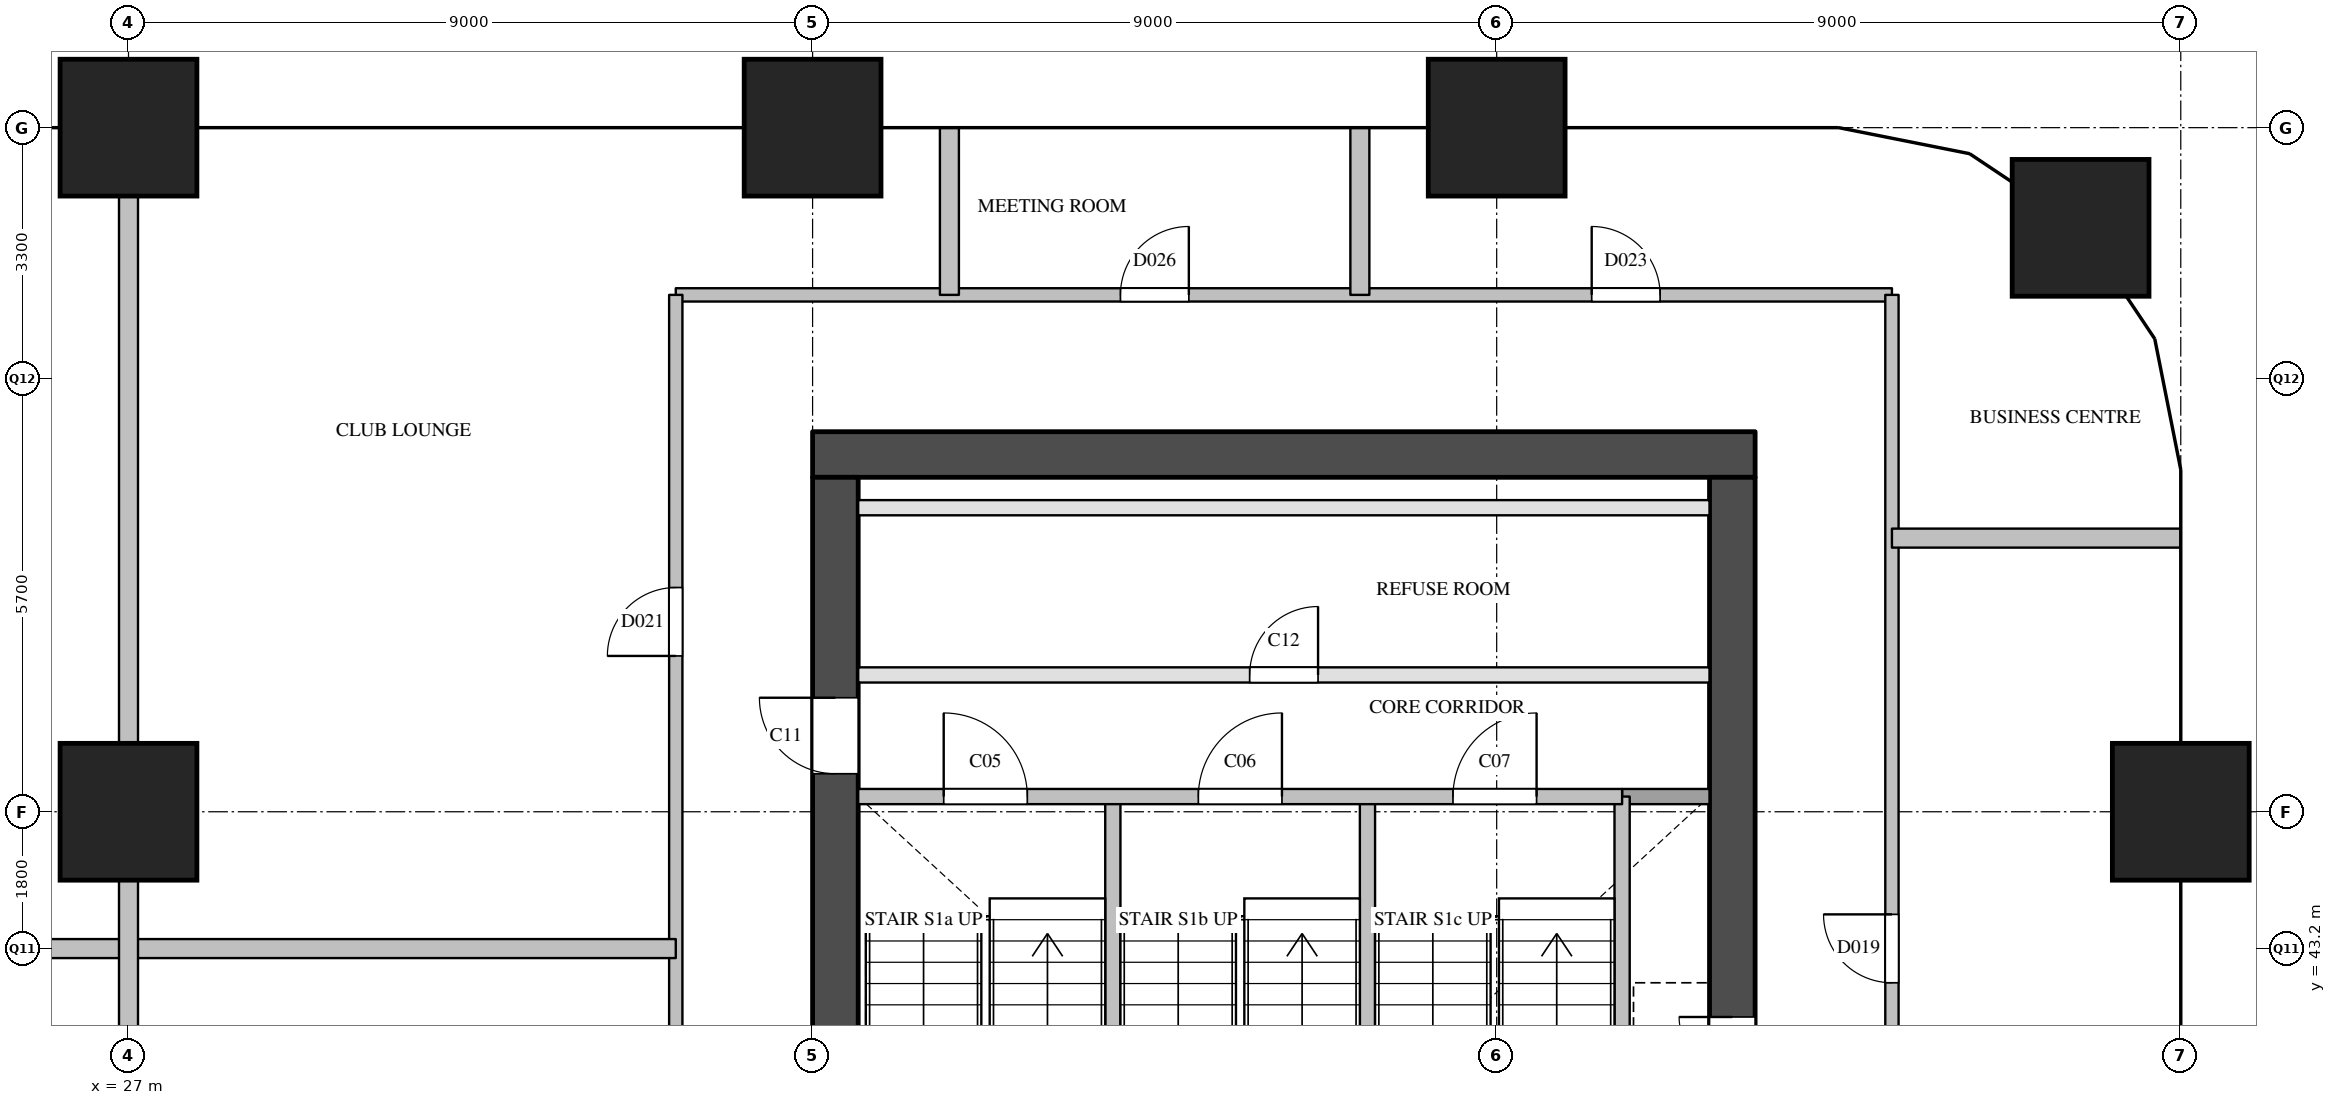
"""IFC4 building model, lengths in metres.
Left out: names, types, materials, properties, quantities, classifications, styles, units other than length and angle.
Written with IfcOpenShell. Run it as: python <this file> out.ifc"""

import sys

from ifc_helpers import new_model, si_unit, direction, frame, frame_2d, origin, origin_2d, place, context, subcontext, project, spatial, rectangle, extrude, element, fill, save


model = new_model("IFC4")
c1 = context("Model", 3, precision=1e-05, world=origin(), true_north=direction((0.0, 1.0)))
c2 = subcontext(c1, "Body", "Model", "MODEL_VIEW")
j1 = project(units=[si_unit("LENGTHUNIT", "METRE"), si_unit("PLANEANGLEUNIT", "RADIAN")], contexts=[c1])
p1 = place(None, origin())
s1 = spatial("IfcSite", under=j1, at=p1, CompositionType="ELEMENT")
p2 = place(p1, origin())
s2 = spatial("IfcBuilding", under=s1, at=p2, CompositionType="ELEMENT")
p3 = place(p2, frame((0.0, 0.0, 89.2)))
s3 = spatial("IfcBuildingStorey", under=s2, at=p3, CompositionType="ELEMENT", Elevation=89.2)
for number, where, z_axis, x_axis in (
    (1, (27.0, 45.0, 0.0), (0.0, 0.0, 1.0), (1.0, 0.0, 0.0)),
    (2, (27.0, 54.0, 0.0), (0.0, 0.0, 1.0), (1.0, 0.0, 0.0)),
    (3, (36.0, 54.0, 0.0), (0.0, 0.0, 1.0), (1.0, 0.0, 0.0)),
    (4, (45.0, 54.0, 0.0), (0.0, 0.0, 1.0), (1.0, 0.0, 0.0)),
    (5, (54.0, 45.0, 0.0), (0.0, 0.0, 1.0), (1.0, 0.0, 0.0)),
    (6, (52.682, 52.682, 0.0), (0.0, 0.0, 1.0), (1.0, 0.0, 0.0)),
):
    element("IfcColumn", number, at=place(p3, frame(where, z_axis=z_axis, x_axis=x_axis)), inside=s3, PredefinedType="COLUMN", context=c2, shape_type="SweptSolid", body=[
        extrude(rectangle(XDim=1.8, YDim=1.8, at=origin_2d()), origin(), (0.0, 0.0, 1.0), 3.8),
    ])
p4 = place(p3, frame((36.0, 49.7, 0.0), z_axis=(0.0, 0.0, 1.0), x_axis=(1.0, 0.0, 0.0)))
e7 = element("IfcWall", 7, at=p4, inside=s3, PredefinedType="SHEAR", context=c2, shape_type="SweptSolid", body=[
    extrude(rectangle(XDim=12.4, YDim=0.6, at=frame_2d((6.2, 0.0))), origin(), (0.0, 0.0, 1.0), 3.5),
])
p5 = place(p3, frame((36.3, 29.1, 0.0), z_axis=(0.0, 0.0, 1.0), x_axis=(0.0, 1.0, 0.0)))
e8 = element("IfcWall", 8, at=p5, inside=s3, PredefinedType="SHEAR", context=c2, shape_type="SweptSolid", body=[
    extrude(rectangle(XDim=20.3, YDim=0.6, at=frame_2d((10.15, 0.0))), origin(), (0.0, 0.0, 1.0), 3.5),
])
p6 = place(p5, frame((3.6, 0.0, 0.0)))
e9 = element("IfcOpeningElement", 9, at=p6, cuts=e8, PredefinedType="OPENING", context=c2, shape_type="SweptSolid", body=[
    extrude(rectangle(XDim=1.8, YDim=2.1, at=frame_2d((0.9, 1.05))), frame((0.0, 0.31, 0.0), z_axis=(0.0, -1.0, 0.0), x_axis=(1.0, 0.0, 0.0)), (0.0, 0.0, 1.0), 0.62),
])
p7 = place(p5, frame((16.4, 0.0, 0.0)))
e10 = element("IfcOpeningElement", 10, at=p7, cuts=e8, PredefinedType="OPENING", context=c2, shape_type="SweptSolid", body=[
    extrude(rectangle(XDim=1.0, YDim=2.1, at=frame_2d((0.5, 1.05))), frame((0.0, 0.31, 0.0), z_axis=(0.0, -1.0, 0.0), x_axis=(1.0, 0.0, 0.0)), (0.0, 0.0, 1.0), 0.62),
])
p8 = place(p3, frame((48.1, 29.1, 0.0), z_axis=(0.0, 0.0, 1.0), x_axis=(0.0, 1.0, 0.0)))
e11 = element("IfcWall", 11, at=p8, inside=s3, PredefinedType="SHEAR", context=c2, shape_type="SweptSolid", body=[
    extrude(rectangle(XDim=20.3, YDim=0.6, at=frame_2d((10.15, 0.0))), origin(), (0.0, 0.0, 1.0), 3.5),
])
p9 = place(p8, frame((12.5, 0.0, 0.0)))
e12 = element("IfcOpeningElement", 12, at=p9, cuts=e11, PredefinedType="OPENING", context=c2, shape_type="SweptSolid", body=[
    extrude(rectangle(XDim=0.7, YDim=2.1, at=frame_2d((0.35, 1.05))), frame((0.0, 0.31, 0.0), z_axis=(0.0, -1.0, 0.0), x_axis=(1.0, 0.0, 0.0)), (0.0, 0.0, 1.0), 0.62),
])
p10 = place(p8, frame((3.9, 0.0, 0.0)))
e13 = element("IfcOpeningElement", 13, at=p10, cuts=e11, PredefinedType="OPENING", context=c2, shape_type="SweptSolid", body=[
    extrude(rectangle(XDim=1.8, YDim=2.1, at=frame_2d((0.9, 1.05))), frame((0.0, 0.31, 0.0), z_axis=(0.0, -1.0, 0.0), x_axis=(1.0, 0.0, 0.0)), (0.0, 0.0, 1.0), 0.62),
])
for number, where, z_axis, x_axis in (
    (14, (39.95, 40.78, 0.0), (0.0, 0.0, 1.0), (0.0, 1.0, 0.0)),
    (15, (43.3, 40.78, 0.0), (0.0, 0.0, 1.0), (0.0, 1.0, 0.0)),
    (16, (46.65, 40.78, 0.0), (0.0, 0.0, 1.0), (0.0, 1.0, 0.0)),
):
    element("IfcWall", number, at=place(p3, frame(where, z_axis=z_axis, x_axis=x_axis)), inside=s3, PredefinedType="SOLIDWALL", context=c2, shape_type="SweptSolid", body=[
        extrude(rectangle(XDim=4.42, YDim=0.2, at=frame_2d((2.21, 0.0))), origin(), (0.0, 0.0, 1.0), 3.5),
    ])
p11 = place(p3, frame((46.65, 45.2, 0.0), z_axis=(0.0, 0.0, 1.0), x_axis=(1.0, 0.0, 0.0)))
e17 = element("IfcWall", 17, at=p11, inside=s3, PredefinedType="SOLIDWALL", context=c2, shape_type="SweptSolid", body=[
    extrude(rectangle(XDim=1.15, YDim=0.2, at=frame_2d((0.575, 0.0))), origin(), (0.0, 0.0, 1.0), 3.5),
])
p12 = place(p3, frame((36.6, 45.2, 0.0), z_axis=(0.0, 0.0, 1.0), x_axis=(1.0, 0.0, 0.0)))
e18 = element("IfcWall", 18, at=p12, inside=s3, PredefinedType="SOLIDWALL", context=c2, shape_type="SweptSolid", body=[
    extrude(rectangle(XDim=10.05, YDim=0.2, at=frame_2d((5.025, 0.0))), origin(), (0.0, 0.0, 1.0), 3.5),
])
p13 = place(p12, frame((1.125, 0.0, 0.0)))
e19 = element("IfcOpeningElement", 19, at=p13, cuts=e18, PredefinedType="OPENING", context=c2, shape_type="SweptSolid", body=[
    extrude(rectangle(XDim=1.1, YDim=2.1, at=frame_2d((0.55, 1.05))), frame((0.0, 0.11, 0.0), z_axis=(0.0, -1.0, 0.0), x_axis=(1.0, 0.0, 0.0)), (0.0, 0.0, 1.0), 0.22),
])
p14 = place(p12, frame((4.475, 0.0, 0.0)))
e20 = element("IfcOpeningElement", 20, at=p14, cuts=e18, PredefinedType="OPENING", context=c2, shape_type="SweptSolid", body=[
    extrude(rectangle(XDim=1.1, YDim=2.1, at=frame_2d((0.55, 1.05))), frame((0.0, 0.11, 0.0), z_axis=(0.0, -1.0, 0.0), x_axis=(1.0, 0.0, 0.0)), (0.0, 0.0, 1.0), 0.22),
])
p15 = place(p12, frame((7.825, 0.0, 0.0)))
e21 = element("IfcOpeningElement", 21, at=p15, cuts=e18, PredefinedType="OPENING", context=c2, shape_type="SweptSolid", body=[
    extrude(rectangle(XDim=1.1, YDim=2.1, at=frame_2d((0.55, 1.05))), frame((0.0, 0.11, 0.0), z_axis=(0.0, -1.0, 0.0), x_axis=(1.0, 0.0, 0.0)), (0.0, 0.0, 1.0), 0.22),
])
p16 = place(p3, frame((36.6, 46.8, 0.0), z_axis=(0.0, 0.0, 1.0), x_axis=(1.0, 0.0, 0.0)))
e22 = element("IfcWall", 22, at=p16, inside=s3, PredefinedType="PARTITIONING", context=c2, shape_type="SweptSolid", body=[
    extrude(rectangle(XDim=11.2, YDim=0.2, at=frame_2d((5.6, 0.0))), origin(), (0.0, 0.0, 1.0), 3.5),
])
p17 = place(p16, frame((5.15, 0.0, 0.0)))
e23 = element("IfcOpeningElement", 23, at=p17, cuts=e22, PredefinedType="OPENING", context=c2, shape_type="SweptSolid", body=[
    extrude(rectangle(XDim=0.9, YDim=2.1, at=frame_2d((0.45, 1.05))), frame((0.0, 0.11, 0.0), z_axis=(0.0, -1.0, 0.0), x_axis=(1.0, 0.0, 0.0)), (0.0, 0.0, 1.0), 0.22),
])
p18 = place(p3, frame((36.6, 49.0, 0.0), z_axis=(0.0, 0.0, 1.0), x_axis=(1.0, 0.0, 0.0)))
e24 = element("IfcWall", 24, at=p18, inside=s3, PredefinedType="PARTITIONING", context=c2, shape_type="SweptSolid", body=[
    extrude(rectangle(XDim=11.2, YDim=0.2, at=frame_2d((5.6, 0.0))), origin(), (0.0, 0.0, 1.0), 3.5),
])
p19 = place(p3, frame((34.2, 51.8, 0.0), z_axis=(0.0, 0.0, 1.0), x_axis=(1.0, 0.0, 0.0)))
e25 = element("IfcWall", 25, at=p19, inside=s3, PredefinedType="PARTITIONING", context=c2, shape_type="SweptSolid", body=[
    extrude(rectangle(XDim=16.0, YDim=0.175, at=frame_2d((8.0, 0.0))), origin(), (0.0, 0.0, 1.0), 3.5),
])
p20 = place(p19, frame((12.05, 0.0, 0.0)))
e26 = element("IfcOpeningElement", 26, at=p20, cuts=e25, PredefinedType="OPENING", context=c2, shape_type="SweptSolid", body=[
    extrude(rectangle(XDim=0.9, YDim=2.1, at=frame_2d((0.45, 1.05))), frame((0.0, 0.097, 0.0), z_axis=(0.0, -1.0, 0.0), x_axis=(1.0, 0.0, 0.0)), (0.0, 0.0, 1.0), 0.195),
])
p21 = place(p19, frame((5.85, 0.0, 0.0)))
e27 = element("IfcOpeningElement", 27, at=p21, cuts=e25, PredefinedType="OPENING", context=c2, shape_type="SweptSolid", body=[
    extrude(rectangle(XDim=0.9, YDim=2.1, at=frame_2d((0.45, 1.05))), frame((0.0, 0.097, 0.0), z_axis=(0.0, -1.0, 0.0), x_axis=(1.0, 0.0, 0.0)), (0.0, 0.0, 1.0), 0.195),
])
p22 = place(p3, frame((34.2, 29.12, 0.0), z_axis=(0.0, 0.0, 1.0), x_axis=(0.0, 1.0, 0.0)))
e28 = element("IfcWall", 28, at=p22, inside=s3, PredefinedType="PARTITIONING", context=c2, shape_type="SweptSolid", body=[
    extrude(rectangle(XDim=22.68, YDim=0.175, at=frame_2d((11.34, 0.0))), origin(), (0.0, 0.0, 1.0), 3.5),
])
p23 = place(p22, frame((1.14, 0.0, 0.0)))
e29 = element("IfcOpeningElement", 29, at=p23, cuts=e28, PredefinedType="OPENING", context=c2, shape_type="SweptSolid", body=[
    extrude(rectangle(XDim=1.0, YDim=2.1, at=frame_2d((0.5, 1.05))), frame((0.0, 0.097, 0.0), z_axis=(0.0, -1.0, 0.0), x_axis=(1.0, 0.0, 0.0)), (0.0, 0.0, 1.0), 0.195),
])
p24 = place(p22, frame((8.18, 0.0, 0.0)))
e30 = element("IfcOpeningElement", 30, at=p24, cuts=e28, PredefinedType="OPENING", context=c2, shape_type="SweptSolid", body=[
    extrude(rectangle(XDim=1.0, YDim=2.1, at=frame_2d((0.5, 1.05))), frame((0.0, 0.097, 0.0), z_axis=(0.0, -1.0, 0.0), x_axis=(1.0, 0.0, 0.0)), (0.0, 0.0, 1.0), 0.195),
])
p25 = place(p22, frame((17.93, 0.0, 0.0)))
e31 = element("IfcOpeningElement", 31, at=p25, cuts=e28, PredefinedType="OPENING", context=c2, shape_type="SweptSolid", body=[
    extrude(rectangle(XDim=0.9, YDim=2.1, at=frame_2d((0.45, 1.05))), frame((0.0, 0.097, 0.0), z_axis=(0.0, -1.0, 0.0), x_axis=(1.0, 0.0, 0.0)), (0.0, 0.0, 1.0), 0.195),
])
p26 = place(p3, frame((50.2, 26.7, 0.0), z_axis=(0.0, 0.0, 1.0), x_axis=(0.0, 1.0, 0.0)))
e32 = element("IfcWall", 32, at=p26, inside=s3, PredefinedType="PARTITIONING", context=c2, shape_type="SweptSolid", body=[
    extrude(rectangle(XDim=25.1, YDim=0.175, at=frame_2d((12.55, 0.0))), origin(), (0.0, 0.0, 1.0), 2.5),
])
p27 = place(p26, frame((2.4, 0.0, 0.0)))
e33 = element("IfcOpeningElement", 33, at=p27, cuts=e32, PredefinedType="OPENING", context=c2, shape_type="SweptSolid", body=[
    extrude(rectangle(XDim=0.9, YDim=2.1, at=frame_2d((0.45, 1.05))), frame((0.0, 0.097, 0.0), z_axis=(0.0, -1.0, 0.0), x_axis=(1.0, 0.0, 0.0)), (0.0, 0.0, 1.0), 0.195),
])
p28 = place(p26, frame((7.9, 0.0, 0.0)))
e34 = element("IfcOpeningElement", 34, at=p28, cuts=e32, PredefinedType="OPENING", context=c2, shape_type="SweptSolid", body=[
    extrude(rectangle(XDim=1.0, YDim=2.1, at=frame_2d((0.5, 1.05))), frame((0.0, 0.097, 0.0), z_axis=(0.0, -1.0, 0.0), x_axis=(1.0, 0.0, 0.0)), (0.0, 0.0, 1.0), 0.195),
])
p29 = place(p26, frame((16.05, 0.0, 0.0)))
e35 = element("IfcOpeningElement", 35, at=p29, cuts=e32, PredefinedType="OPENING", context=c2, shape_type="SweptSolid", body=[
    extrude(rectangle(XDim=0.9, YDim=2.1, at=frame_2d((0.45, 1.05))), frame((0.0, 0.097, 0.0), z_axis=(0.0, -1.0, 0.0), x_axis=(1.0, 0.0, 0.0)), (0.0, 0.0, 1.0), 0.195),
])
p30 = place(p3, frame((19.8, 43.2, 0.0), z_axis=(0.0, 0.0, 1.0), x_axis=(1.0, 0.0, 0.0)))
e36 = element("IfcWall", 36, at=p30, inside=s3, PredefinedType="PARTITIONING", context=c2, shape_type="SweptSolid", body=[
    extrude(rectangle(XDim=14.4, YDim=0.25, at=frame_2d((7.2, 0.0))), origin(), (0.0, 0.0, 1.0), 2.5),
])
p31 = place(p3, frame((50.2, 48.6, 0.0), z_axis=(0.0, 0.0, 1.0), x_axis=(1.0, 0.0, 0.0)))
e37 = element("IfcWall", 37, at=p31, inside=s3, PredefinedType="PARTITIONING", context=c2, shape_type="SweptSolid", body=[
    extrude(rectangle(XDim=3.8, YDim=0.25, at=frame_2d((1.9, 0.0))), origin(), (0.0, 0.0, 1.0), 2.5),
])
p32 = place(p3, frame((27.0, 27.0, 0.0), z_axis=(0.0, 0.0, 1.0), x_axis=(0.0, 1.0, 0.0)))
e38 = element("IfcWall", 38, at=p32, inside=s3, PredefinedType="PARTITIONING", context=c2, shape_type="SweptSolid", body=[
    extrude(rectangle(XDim=27.0, YDim=0.25, at=frame_2d((13.5, 0.0))), origin(), (0.0, 0.0, 1.0), 2.5),
])
for number, where, z_axis, x_axis in (
    (39, (37.8, 51.8, 0.0), (0.0, 0.0, 1.0), (0.0, 1.0, 0.0)),
    (40, (43.2, 51.8, 0.0), (0.0, 0.0, 1.0), (0.0, 1.0, 0.0)),
):
    element("IfcWall", number, at=place(p3, frame(where, z_axis=z_axis, x_axis=x_axis)), inside=s3, PredefinedType="PARTITIONING", context=c2, shape_type="SweptSolid", body=[
        extrude(rectangle(XDim=2.2, YDim=0.25, at=frame_2d((1.1, 0.0))), origin(), (0.0, 0.0, 1.0), 2.5),
    ])
p33 = place(p13, origin())
e41 = element("IfcDoor", 41, at=p33, inside=s3, OperationType="SINGLE_SWING_LEFT", PredefinedType="DOOR", context=c2, shape_type="SweptSolid", body=[
    extrude(rectangle(XDim=1.1, YDim=2.1, at=frame_2d((0.55, 1.05))), frame((0.0, 0.025, 0.0), z_axis=(0.0, -1.0, 0.0), x_axis=(1.0, 0.0, 0.0)), (0.0, 0.0, 1.0), 0.05),
])
fill(e19, e41)
p34 = place(p14, origin())
e42 = element("IfcDoor", 42, at=p34, inside=s3, OperationType="SINGLE_SWING_RIGHT", PredefinedType="DOOR", context=c2, shape_type="SweptSolid", body=[
    extrude(rectangle(XDim=1.1, YDim=2.1, at=frame_2d((0.55, 1.05))), frame((0.0, 0.025, 0.0), z_axis=(0.0, -1.0, 0.0), x_axis=(1.0, 0.0, 0.0)), (0.0, 0.0, 1.0), 0.05),
])
fill(e20, e42)
p35 = place(p15, origin())
e43 = element("IfcDoor", 43, at=p35, inside=s3, OperationType="SINGLE_SWING_RIGHT", PredefinedType="DOOR", context=c2, shape_type="SweptSolid", body=[
    extrude(rectangle(XDim=1.1, YDim=2.1, at=frame_2d((0.55, 1.05))), frame((0.0, 0.025, 0.0), z_axis=(0.0, -1.0, 0.0), x_axis=(1.0, 0.0, 0.0)), (0.0, 0.0, 1.0), 0.05),
])
fill(e21, e43)
p36 = place(p9, origin())
e44 = element("IfcDoor", 44, at=p36, inside=s3, OperationType="SINGLE_SWING_RIGHT", PredefinedType="DOOR", context=c2, shape_type="SweptSolid", body=[
    extrude(rectangle(XDim=0.7, YDim=2.1, at=frame_2d((0.35, 1.05))), frame((0.0, 0.025, 0.0), z_axis=(0.0, -1.0, 0.0), x_axis=(1.0, 0.0, 0.0)), (0.0, 0.0, 1.0), 0.05),
])
fill(e12, e44)
p37 = place(p7, origin())
e45 = element("IfcDoor", 45, at=p37, inside=s3, OperationType="SINGLE_SWING_RIGHT", PredefinedType="DOOR", context=c2, shape_type="SweptSolid", body=[
    extrude(rectangle(XDim=1.0, YDim=2.1, at=frame_2d((0.5, 1.05))), frame((0.0, 0.025, 0.0), z_axis=(0.0, -1.0, 0.0), x_axis=(1.0, 0.0, 0.0)), (0.0, 0.0, 1.0), 0.05),
])
fill(e10, e45)
p38 = place(p17, origin())
e46 = element("IfcDoor", 46, at=p38, inside=s3, OperationType="SINGLE_SWING_RIGHT", PredefinedType="DOOR", context=c2, shape_type="SweptSolid", body=[
    extrude(rectangle(XDim=0.9, YDim=2.1, at=frame_2d((0.45, 1.05))), frame((0.0, 0.025, 0.0), z_axis=(0.0, -1.0, 0.0), x_axis=(1.0, 0.0, 0.0)), (0.0, 0.0, 1.0), 0.05),
])
fill(e23, e46)
p39 = place(p29, origin())
e47 = element("IfcDoor", 47, at=p39, inside=s3, OperationType="SINGLE_SWING_RIGHT", PredefinedType="DOOR", context=c2, shape_type="SweptSolid", body=[
    extrude(rectangle(XDim=0.9, YDim=2.1, at=frame_2d((0.45, 1.05))), frame((0.0, 0.025, 0.0), z_axis=(0.0, -1.0, 0.0), x_axis=(1.0, 0.0, 0.0)), (0.0, 0.0, 1.0), 0.05),
])
fill(e35, e47)
p40 = place(p25, origin())
e48 = element("IfcDoor", 48, at=p40, inside=s3, OperationType="SINGLE_SWING_LEFT", PredefinedType="DOOR", context=c2, shape_type="SweptSolid", body=[
    extrude(rectangle(XDim=0.9, YDim=2.1, at=frame_2d((0.45, 1.05))), frame((0.0, 0.025, 0.0), z_axis=(0.0, -1.0, 0.0), x_axis=(1.0, 0.0, 0.0)), (0.0, 0.0, 1.0), 0.05),
])
fill(e31, e48)
p41 = place(p20, origin())
e49 = element("IfcDoor", 49, at=p41, inside=s3, OperationType="SINGLE_SWING_LEFT", PredefinedType="DOOR", context=c2, shape_type="SweptSolid", body=[
    extrude(rectangle(XDim=0.9, YDim=2.1, at=frame_2d((0.45, 1.05))), frame((0.0, 0.025, 0.0), z_axis=(0.0, -1.0, 0.0), x_axis=(1.0, 0.0, 0.0)), (0.0, 0.0, 1.0), 0.05),
])
fill(e26, e49)
p42 = place(p21, origin())
e50 = element("IfcDoor", 50, at=p42, inside=s3, OperationType="SINGLE_SWING_RIGHT", PredefinedType="DOOR", context=c2, shape_type="SweptSolid", body=[
    extrude(rectangle(XDim=0.9, YDim=2.1, at=frame_2d((0.45, 1.05))), frame((0.0, 0.025, 0.0), z_axis=(0.0, -1.0, 0.0), x_axis=(1.0, 0.0, 0.0)), (0.0, 0.0, 1.0), 0.05),
])
fill(e27, e50)
save(model, sys.argv[1])
